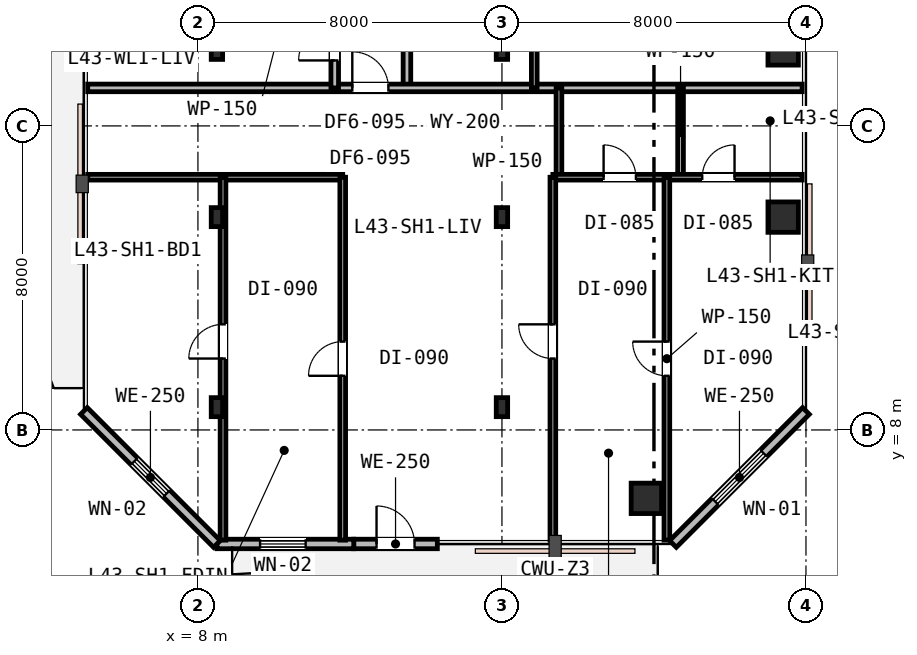
"""IFC4 building model, lengths in metres.
Left out: names, types, materials, properties, quantities, classifications, styles, units other than length and angle.
Written with IfcOpenShell. Run it as: python <this file> out.ifc"""

import sys

from ifc_helpers import new_model, si_unit, direction, frame, frame_2d, origin, origin_2d, place, context, subcontext, project, spatial, rectangle, i_section, extrude, element, fill, save


model = new_model("IFC4")
c1 = context("Model", 3, precision=1e-05, world=origin(), true_north=direction((0.0, 1.0)))
c2 = subcontext(c1, "Body", "Model", "MODEL_VIEW")
j1 = project(units=[si_unit("LENGTHUNIT", "METRE"), si_unit("PLANEANGLEUNIT", "RADIAN")], contexts=[c1])
p1 = place(None, origin())
s1 = spatial("IfcSite", under=j1, at=p1, CompositionType="ELEMENT")
p2 = place(p1, origin())
s2 = spatial("IfcBuilding", under=s1, at=p2, CompositionType="ELEMENT")
p3 = place(p2, frame((0.0, 0.0, 168.6)))
s3 = spatial("IfcBuildingStorey", under=s2, at=p3, CompositionType="ELEMENT", Elevation=168.6)
for number, where, z_axis, x_axis in (
    (1, (19.8, 6.2, 0.0), (0.0, 0.0, 1.0), (1.0, 0.0, 0.0)),
    (2, (23.4, 13.6, 0.0), (0.0, 0.0, 1.0), (1.0, 0.0, 0.0)),
    (3, (23.4, 18.0, 0.0), (0.0, 0.0, 1.0), (1.0, 0.0, 0.0)),
):
    element("IfcColumn", number, at=place(p3, frame(where, z_axis=z_axis, x_axis=x_axis)), inside=s3, PredefinedType="COLUMN", context=c2, shape_type="SweptSolid", body=[
        extrude(rectangle(XDim=0.8, YDim=0.8, at=origin_2d()), origin(), (0.0, 0.0, 1.0), 3.6),
    ])
for number, where, z_axis, x_axis in (
    (4, (8.5, 8.6, 0.0), (0.0, 0.0, 1.0), (1.0, 0.0, 0.0)),
    (5, (16.0, 8.6, 0.0), (0.0, 0.0, 1.0), (1.0, 0.0, 0.0)),
    (6, (8.5, 13.6, 0.0), (0.0, 0.0, 1.0), (1.0, 0.0, 0.0)),
    (7, (16.0, 13.6, 0.0), (0.0, 0.0, 1.0), (1.0, 0.0, 0.0)),
    (8, (8.5, 18.0, 0.0), (0.0, 0.0, 1.0), (1.0, 0.0, 0.0)),
    (9, (16.0, 18.0, 0.0), (0.0, 0.0, 1.0), (1.0, 0.0, 0.0)),
):
    element("IfcColumn", number, at=place(p3, frame(where, z_axis=z_axis, x_axis=x_axis)), inside=s3, PredefinedType="COLUMN", context=c2, shape_type="SweptSolid", body=[
        extrude(i_section(OverallWidth=0.3, OverallDepth=0.5, WebThickness=0.015, FlangeThickness=0.028, FilletRadius=0.027, at=origin_2d()), origin(), (0.0, 0.0, 1.0), 3.6),
    ])
p4 = place(p3, frame((12.1, 5.0, 0.0), z_axis=(0.0, 0.0, 1.0), x_axis=(1.0, 0.0, 0.0)))
e10 = element("IfcWall", 10, at=p4, inside=s3, PredefinedType="STANDARD", context=c2, shape_type="SweptSolid", body=[
    extrude(rectangle(XDim=2.2, YDim=0.25, at=frame_2d((1.1, 0.0))), origin(), (0.0, 0.0, 1.0), 3.33),
])
p5 = place(p4, frame((0.6, 0.0, 0.0)))
e11 = element("IfcOpeningElement", 11, at=p5, cuts=e10, PredefinedType="OPENING", context=c2, shape_type="SweptSolid", body=[
    extrude(rectangle(XDim=1.0, YDim=2.15, at=frame_2d((0.5, 1.075))), frame((0.0, 0.135, 0.0), z_axis=(0.0, -1.0, 0.0), x_axis=(1.0, 0.0, 0.0)), (0.0, 0.0, 1.0), 0.27),
])
p6 = place(p3, frame((8.5, 5.0, 0.0), z_axis=(0.0, 0.0, 1.0), x_axis=(1.0, 0.0, 0.0)))
e12 = element("IfcWall", 12, at=p6, inside=s3, PredefinedType="STANDARD", context=c2, shape_type="SweptSolid", body=[
    extrude(rectangle(XDim=3.6, YDim=0.25, at=frame_2d((1.8, 0.0))), origin(), (0.0, 0.0, 1.0), 3.33),
])
p7 = place(p6, frame((1.135, 0.0, 0.85)))
e13 = element("IfcOpeningElement", 13, at=p7, cuts=e12, PredefinedType="OPENING", context=c2, shape_type="SweptSolid", body=[
    extrude(rectangle(XDim=1.2, YDim=1.6, at=frame_2d((0.6, 0.8))), frame((0.0, 0.135, 0.0), z_axis=(0.0, -1.0, 0.0), x_axis=(1.0, 0.0, 0.0)), (0.0, 0.0, 1.0), 0.27),
])
p8 = place(p3, frame((20.5, 5.0, 0.0), z_axis=(0.0, 0.0, 1.0), x_axis=(0.707106781187, 0.707106781187, 0.0)))
e14 = element("IfcWall", 14, at=p8, inside=s3, PredefinedType="STANDARD", context=c2, shape_type="SweptSolid", body=[
    extrude(rectangle(XDim=4.95, YDim=0.25, at=frame_2d((2.475, 0.0))), origin(), (0.0, 0.0, 1.0), 3.33),
])
p9 = place(p8, frame((1.575, 0.0, 0.75)))
e15 = element("IfcOpeningElement", 15, at=p9, cuts=e14, PredefinedType="OPENING", context=c2, shape_type="SweptSolid", body=[
    extrude(rectangle(XDim=1.8, YDim=1.85, at=frame_2d((0.9, 0.925))), frame((0.0, 0.135, 0.0), z_axis=(0.0, -1.0, 0.0), x_axis=(1.0, 0.0, 0.0)), (0.0, 0.0, 1.0), 0.27),
])
p10 = place(p3, frame((5.0, 8.5, 0.0), z_axis=(0.0, 0.0, 1.0), x_axis=(0.707106781187, -0.707106781187, 0.0)))
e16 = element("IfcWall", 16, at=p10, inside=s3, PredefinedType="STANDARD", context=c2, shape_type="SweptSolid", body=[
    extrude(rectangle(XDim=4.95, YDim=0.25, at=frame_2d((2.475, 0.0))), origin(), (0.0, 0.0, 1.0), 3.33),
])
p11 = place(p10, frame((1.875, 0.0, 0.85)))
e17 = element("IfcOpeningElement", 17, at=p11, cuts=e16, PredefinedType="OPENING", context=c2, shape_type="SweptSolid", body=[
    extrude(rectangle(XDim=1.2, YDim=1.6, at=frame_2d((0.6, 0.8))), frame((0.0, 0.135, 0.0), z_axis=(0.0, -1.0, 0.0), x_axis=(1.0, 0.0, 0.0)), (0.0, 0.0, 1.0), 0.27),
])
p12 = place(p3, frame((13.5, 17.0, 0.0), z_axis=(0.0, 0.0, 1.0), x_axis=(0.0, 1.0, 0.0)))
e18 = element("IfcWall", 18, at=p12, inside=s3, PredefinedType="PARTITIONING", context=c2, shape_type="SweptSolid", body=[
    extrude(rectangle(XDim=18.0, YDim=0.2, at=frame_2d((9.0, 0.0))), origin(), (0.0, 0.0, 1.0), 2.92),
])
p13 = place(p12, frame((15.425, 0.0, 0.0)))
e19 = element("IfcOpeningElement", 19, at=p13, cuts=e18, PredefinedType="OPENING", context=c2, shape_type="SweptSolid", body=[
    extrude(rectangle(XDim=0.95, YDim=2.15, at=frame_2d((0.475, 1.075))), frame((0.0, 0.11, 0.0), z_axis=(0.0, -1.0, 0.0), x_axis=(1.0, 0.0, 0.0)), (0.0, 0.0, 1.0), 0.22),
])
p14 = place(p12, frame((10.225, 0.0, 0.0)))
e20 = element("IfcOpeningElement", 20, at=p14, cuts=e18, PredefinedType="OPENING", context=c2, shape_type="SweptSolid", body=[
    extrude(rectangle(XDim=0.95, YDim=2.15, at=frame_2d((0.475, 1.075))), frame((0.0, 0.11, 0.0), z_axis=(0.0, -1.0, 0.0), x_axis=(1.0, 0.0, 0.0)), (0.0, 0.0, 1.0), 0.22),
])
p15 = place(p3, frame((5.1, 17.0, 0.0), z_axis=(0.0, 0.0, 1.0), x_axis=(1.0, 0.0, 0.0)))
e21 = element("IfcWall", 21, at=p15, inside=s3, PredefinedType="PARTITIONING", context=c2, shape_type="SweptSolid", body=[
    extrude(rectangle(XDim=18.8, YDim=0.2, at=frame_2d((9.4, 0.0))), origin(), (0.0, 0.0, 1.0), 2.92),
])
p16 = place(p15, frame((6.962, 0.0, 0.0)))
e22 = element("IfcOpeningElement", 22, at=p16, cuts=e21, PredefinedType="OPENING", context=c2, shape_type="SweptSolid", body=[
    extrude(rectangle(XDim=0.95, YDim=2.15, at=frame_2d((0.475, 1.075))), frame((0.0, 0.11, 0.0), z_axis=(0.0, -1.0, 0.0), x_axis=(1.0, 0.0, 0.0)), (0.0, 0.0, 1.0), 0.22),
])
p17 = place(p3, frame((11.6, 17.0, 0.0), z_axis=(0.0, 0.0, 1.0), x_axis=(0.0, 1.0, 0.0)))
e23 = element("IfcWall", 23, at=p17, inside=s3, PredefinedType="PARTITIONING", context=c2, shape_type="SweptSolid", body=[
    extrude(rectangle(XDim=11.6, YDim=0.2, at=frame_2d((5.8, 0.0))), origin(), (0.0, 0.0, 1.0), 2.92),
])
p18 = place(p17, frame((0.723, 0.0, 0.0)))
e24 = element("IfcOpeningElement", 24, at=p18, cuts=e23, PredefinedType="OPENING", context=c2, shape_type="SweptSolid", body=[
    extrude(rectangle(XDim=0.95, YDim=2.15, at=frame_2d((0.475, 1.075))), frame((0.0, 0.11, 0.0), z_axis=(0.0, -1.0, 0.0), x_axis=(1.0, 0.0, 0.0)), (0.0, 0.0, 1.0), 0.22),
])
p19 = place(p3, frame((16.85, 17.0, 0.0), z_axis=(0.0, 0.0, 1.0), x_axis=(0.0, 1.0, 0.0)))
e25 = element("IfcWall", 25, at=p19, inside=s3, PredefinedType="PARTITIONING", context=c2, shape_type="SweptSolid", body=[
    extrude(rectangle(XDim=9.8, YDim=0.15, at=frame_2d((4.9, 0.0))), origin(), (0.0, 0.0, 1.0), 2.92),
])
p20 = place(p19, frame((5.598, 0.0, 0.0)))
e26 = element("IfcOpeningElement", 26, at=p20, cuts=e25, PredefinedType="OPENING", context=c2, shape_type="SweptSolid", body=[
    extrude(rectangle(XDim=0.85, YDim=2.15, at=frame_2d((0.425, 1.075))), frame((0.0, 0.085, 0.0), z_axis=(0.0, -1.0, 0.0), x_axis=(1.0, 0.0, 0.0)), (0.0, 0.0, 1.0), 0.17),
])
p21 = place(p19, frame((8.496, 0.0, 0.0)))
e27 = element("IfcOpeningElement", 27, at=p21, cuts=e25, PredefinedType="OPENING", context=c2, shape_type="SweptSolid", body=[
    extrude(rectangle(XDim=0.85, YDim=2.15, at=frame_2d((0.425, 1.075))), frame((0.0, 0.085, 0.0), z_axis=(0.0, -1.0, 0.0), x_axis=(1.0, 0.0, 0.0)), (0.0, 0.0, 1.0), 0.17),
])
p22 = place(p19, frame((2.268, 0.0, 0.0)))
e28 = element("IfcOpeningElement", 28, at=p22, cuts=e25, PredefinedType="OPENING", context=c2, shape_type="SweptSolid", body=[
    extrude(rectangle(XDim=0.85, YDim=2.15, at=frame_2d((0.425, 1.075))), frame((0.0, 0.085, 0.0), z_axis=(0.0, -1.0, 0.0), x_axis=(1.0, 0.0, 0.0)), (0.0, 0.0, 1.0), 0.17),
])
p23 = place(p3, frame((17.5, 14.65, 0.0), z_axis=(0.0, 0.0, 1.0), x_axis=(0.0, 1.0, 0.0)))
e29 = element("IfcWall", 29, at=p23, inside=s3, PredefinedType="PARTITIONING", context=c2, shape_type="SweptSolid", body=[
    extrude(rectangle(XDim=2.35, YDim=0.15, at=frame_2d((1.175, 0.0))), origin(), (0.0, 0.0, 1.0), 3.33),
])
p24 = place(p3, frame((20.7, 14.65, 0.0), z_axis=(0.0, 0.0, 1.0), x_axis=(0.0, 1.0, 0.0)))
e30 = element("IfcWall", 30, at=p24, inside=s3, PredefinedType="PARTITIONING", context=c2, shape_type="SweptSolid", body=[
    extrude(rectangle(XDim=2.35, YDim=0.15, at=frame_2d((1.175, 0.0))), origin(), (0.0, 0.0, 1.0), 3.07),
])
p25 = place(p3, frame((17.34, 14.65, 0.0), z_axis=(0.0, 0.0, 1.0), x_axis=(1.0, 0.0, 0.0)))
e31 = element("IfcWall", 31, at=p25, inside=s3, PredefinedType="PARTITIONING", context=c2, shape_type="SweptSolid", body=[
    extrude(rectangle(XDim=6.56, YDim=0.15, at=frame_2d((3.28, 0.0))), origin(), (0.0, 0.0, 1.0), 3.02),
])
p26 = place(p25, frame((1.335, 0.0, 0.0)))
e32 = element("IfcOpeningElement", 32, at=p26, cuts=e31, PredefinedType="OPENING", context=c2, shape_type="SweptSolid", body=[
    extrude(rectangle(XDim=0.85, YDim=2.15, at=frame_2d((0.425, 1.075))), frame((0.0, 0.085, 0.0), z_axis=(0.0, -1.0, 0.0), x_axis=(1.0, 0.0, 0.0)), (0.0, 0.0, 1.0), 0.17),
])
p27 = place(p25, frame((3.93, 0.0, 0.0)))
e33 = element("IfcOpeningElement", 33, at=p27, cuts=e31, PredefinedType="OPENING", context=c2, shape_type="SweptSolid", body=[
    extrude(rectangle(XDim=0.85, YDim=2.15, at=frame_2d((0.425, 1.075))), frame((0.0, 0.085, 0.0), z_axis=(0.0, -1.0, 0.0), x_axis=(1.0, 0.0, 0.0)), (0.0, 0.0, 1.0), 0.17),
])
p28 = place(p3, frame((5.1, 14.65, 0.0), z_axis=(0.0, 0.0, 1.0), x_axis=(1.0, 0.0, 0.0)))
e34 = element("IfcWall", 34, at=p28, inside=s3, PredefinedType="PARTITIONING", context=c2, shape_type="SweptSolid", body=[
    extrude(rectangle(XDim=6.71, YDim=0.15, at=frame_2d((3.355, 0.0))), origin(), (0.0, 0.0, 1.0), 2.92),
])
p29 = place(p3, frame((8.66, 5.1, 0.0), z_axis=(0.0, 0.0, 1.0), x_axis=(0.0, 1.0, 0.0)))
e35 = element("IfcWall", 35, at=p29, inside=s3, PredefinedType="PARTITIONING", context=c2, shape_type="SweptSolid", body=[
    extrude(rectangle(XDim=9.55, YDim=0.15, at=frame_2d((4.775, 0.0))), origin(), (0.0, 0.0, 1.0), 2.92),
])
p30 = place(p29, frame((4.779, 0.0, 0.0)))
e36 = element("IfcOpeningElement", 36, at=p30, cuts=e35, PredefinedType="OPENING", context=c2, shape_type="SweptSolid", body=[
    extrude(rectangle(XDim=0.9, YDim=2.15, at=frame_2d((0.45, 1.075))), frame((0.0, 0.085, 0.0), z_axis=(0.0, -1.0, 0.0), x_axis=(1.0, 0.0, 0.0)), (0.0, 0.0, 1.0), 0.17),
])
p31 = place(p3, frame((20.34, 5.1, 0.0), z_axis=(0.0, 0.0, 1.0), x_axis=(0.0, 1.0, 0.0)))
e37 = element("IfcWall", 37, at=p31, inside=s3, PredefinedType="PARTITIONING", context=c2, shape_type="SweptSolid", body=[
    extrude(rectangle(XDim=9.55, YDim=0.15, at=frame_2d((4.775, 0.0))), origin(), (0.0, 0.0, 1.0), 2.92),
])
p32 = place(p31, frame((4.325, 0.0, 0.0)))
e38 = element("IfcOpeningElement", 38, at=p32, cuts=e37, PredefinedType="OPENING", context=c2, shape_type="SweptSolid", body=[
    extrude(rectangle(XDim=0.9, YDim=2.15, at=frame_2d((0.45, 1.075))), frame((0.0, 0.085, 0.0), z_axis=(0.0, -1.0, 0.0), x_axis=(1.0, 0.0, 0.0)), (0.0, 0.0, 1.0), 0.17),
])
p33 = place(p3, frame((17.34, 5.1, 0.0), z_axis=(0.0, 0.0, 1.0), x_axis=(0.0, 1.0, 0.0)))
e39 = element("IfcWall", 39, at=p33, inside=s3, PredefinedType="PARTITIONING", context=c2, shape_type="SweptSolid", body=[
    extrude(rectangle(XDim=9.55, YDim=0.15, at=frame_2d((4.775, 0.0))), origin(), (0.0, 0.0, 1.0), 2.92),
])
p34 = place(p33, frame((4.779, 0.0, 0.0)))
e40 = element("IfcOpeningElement", 40, at=p34, cuts=e39, PredefinedType="OPENING", context=c2, shape_type="SweptSolid", body=[
    extrude(rectangle(XDim=0.9, YDim=2.15, at=frame_2d((0.45, 1.075))), frame((0.0, 0.085, 0.0), z_axis=(0.0, -1.0, 0.0), x_axis=(1.0, 0.0, 0.0)), (0.0, 0.0, 1.0), 0.17),
])
p35 = place(p3, frame((11.81, 5.1, 0.0), z_axis=(0.0, 0.0, 1.0), x_axis=(0.0, 1.0, 0.0)))
e41 = element("IfcWall", 41, at=p35, inside=s3, PredefinedType="PARTITIONING", context=c2, shape_type="SweptSolid", body=[
    extrude(rectangle(XDim=9.55, YDim=0.15, at=frame_2d((4.775, 0.0))), origin(), (0.0, 0.0, 1.0), 2.92),
])
p36 = place(p35, frame((4.325, 0.0, 0.0)))
e42 = element("IfcOpeningElement", 42, at=p36, cuts=e41, PredefinedType="OPENING", context=c2, shape_type="SweptSolid", body=[
    extrude(rectangle(XDim=0.9, YDim=2.15, at=frame_2d((0.45, 1.075))), frame((0.0, 0.085, 0.0), z_axis=(0.0, -1.0, 0.0), x_axis=(1.0, 0.0, 0.0)), (0.0, 0.0, 1.0), 0.17),
])
p37 = place(p5, origin())
e43 = element("IfcDoor", 43, at=p37, inside=s3, OperationType="SINGLE_SWING_LEFT", PredefinedType="DOOR", context=c2, shape_type="SweptSolid", body=[
    extrude(rectangle(XDim=1.0, YDim=2.15, at=frame_2d((0.5, 1.075))), frame((0.0, 0.025, 0.0), z_axis=(0.0, -1.0, 0.0), x_axis=(1.0, 0.0, 0.0)), (0.0, 0.0, 1.0), 0.05),
])
fill(e11, e43)
p38 = place(p7, origin())
e44 = element("IfcWindow", 44, at=p38, inside=s3, PartitioningType="SINGLE_PANEL", PredefinedType="WINDOW", context=c2, shape_type="SweptSolid", body=[
    extrude(rectangle(XDim=1.2, YDim=1.6, at=frame_2d((0.6, 0.8))), frame((0.0, 0.03, 0.0), z_axis=(0.0, -1.0, 0.0), x_axis=(1.0, 0.0, 0.0)), (0.0, 0.0, 1.0), 0.06),
])
fill(e13, e44)
p39 = place(p9, origin())
e45 = element("IfcWindow", 45, at=p39, inside=s3, PartitioningType="SINGLE_PANEL", PredefinedType="WINDOW", context=c2, shape_type="SweptSolid", body=[
    extrude(rectangle(XDim=1.8, YDim=1.85, at=frame_2d((0.9, 0.925))), frame((0.0, 0.03, 0.0), z_axis=(0.0, -1.0, 0.0), x_axis=(1.0, 0.0, 0.0)), (0.0, 0.0, 1.0), 0.06),
])
fill(e15, e45)
p40 = place(p11, origin())
e46 = element("IfcWindow", 46, at=p40, inside=s3, PartitioningType="SINGLE_PANEL", PredefinedType="WINDOW", context=c2, shape_type="SweptSolid", body=[
    extrude(rectangle(XDim=1.2, YDim=1.6, at=frame_2d((0.6, 0.8))), frame((0.0, 0.03, 0.0), z_axis=(0.0, -1.0, 0.0), x_axis=(1.0, 0.0, 0.0)), (0.0, 0.0, 1.0), 0.06),
])
fill(e17, e46)
p41 = place(p18, origin())
e47 = element("IfcDoor", 47, at=p41, inside=s3, OperationType="SINGLE_SWING_LEFT", PredefinedType="DOOR", context=c2, shape_type="SweptSolid", body=[
    extrude(rectangle(XDim=0.95, YDim=2.15, at=frame_2d((0.475, 1.075))), frame((0.0, 0.025, 0.0), z_axis=(0.0, -1.0, 0.0), x_axis=(1.0, 0.0, 0.0)), (0.0, 0.0, 1.0), 0.05),
])
fill(e24, e47)
p42 = place(p16, origin())
e48 = element("IfcDoor", 48, at=p42, inside=s3, OperationType="SINGLE_SWING_LEFT", PredefinedType="DOOR", context=c2, shape_type="SweptSolid", body=[
    extrude(rectangle(XDim=0.95, YDim=2.15, at=frame_2d((0.475, 1.075))), frame((0.0, 0.025, 0.0), z_axis=(0.0, -1.0, 0.0), x_axis=(1.0, 0.0, 0.0)), (0.0, 0.0, 1.0), 0.05),
])
fill(e22, e48)
p43 = place(p26, origin())
e49 = element("IfcDoor", 49, at=p43, inside=s3, OperationType="SINGLE_SWING_LEFT", PredefinedType="DOOR", context=c2, shape_type="SweptSolid", body=[
    extrude(rectangle(XDim=0.85, YDim=2.15, at=frame_2d((0.425, 1.075))), frame((0.0, 0.025, 0.0), z_axis=(0.0, -1.0, 0.0), x_axis=(1.0, 0.0, 0.0)), (0.0, 0.0, 1.0), 0.05),
])
fill(e32, e49)
p44 = place(p27, origin())
e50 = element("IfcDoor", 50, at=p44, inside=s3, OperationType="SINGLE_SWING_RIGHT", PredefinedType="DOOR", context=c2, shape_type="SweptSolid", body=[
    extrude(rectangle(XDim=0.85, YDim=2.15, at=frame_2d((0.425, 1.075))), frame((0.0, 0.025, 0.0), z_axis=(0.0, -1.0, 0.0), x_axis=(1.0, 0.0, 0.0)), (0.0, 0.0, 1.0), 0.05),
])
fill(e33, e50)
p45 = place(p30, origin())
e51 = element("IfcDoor", 51, at=p45, inside=s3, OperationType="SINGLE_SWING_LEFT", PredefinedType="DOOR", context=c2, shape_type="SweptSolid", body=[
    extrude(rectangle(XDim=0.9, YDim=2.15, at=frame_2d((0.45, 1.075))), frame((0.0, 0.025, 0.0), z_axis=(0.0, -1.0, 0.0), x_axis=(1.0, 0.0, 0.0)), (0.0, 0.0, 1.0), 0.05),
])
fill(e36, e51)
p46 = place(p32, origin())
e52 = element("IfcDoor", 52, at=p46, inside=s3, OperationType="SINGLE_SWING_RIGHT", PredefinedType="DOOR", context=c2, shape_type="SweptSolid", body=[
    extrude(rectangle(XDim=0.9, YDim=2.15, at=frame_2d((0.45, 1.075))), frame((0.0, 0.025, 0.0), z_axis=(0.0, -1.0, 0.0), x_axis=(1.0, 0.0, 0.0)), (0.0, 0.0, 1.0), 0.05),
])
fill(e38, e52)
p47 = place(p34, origin())
e53 = element("IfcDoor", 53, at=p47, inside=s3, OperationType="SINGLE_SWING_RIGHT", PredefinedType="DOOR", context=c2, shape_type="SweptSolid", body=[
    extrude(rectangle(XDim=0.9, YDim=2.15, at=frame_2d((0.45, 1.075))), frame((0.0, 0.025, 0.0), z_axis=(0.0, -1.0, 0.0), x_axis=(1.0, 0.0, 0.0)), (0.0, 0.0, 1.0), 0.05),
])
fill(e40, e53)
p48 = place(p36, origin())
e54 = element("IfcDoor", 54, at=p48, inside=s3, OperationType="SINGLE_SWING_LEFT", PredefinedType="DOOR", context=c2, shape_type="SweptSolid", body=[
    extrude(rectangle(XDim=0.9, YDim=2.15, at=frame_2d((0.45, 1.075))), frame((0.0, 0.025, 0.0), z_axis=(0.0, -1.0, 0.0), x_axis=(1.0, 0.0, 0.0)), (0.0, 0.0, 1.0), 0.05),
])
fill(e42, e54)
save(model, sys.argv[1])
